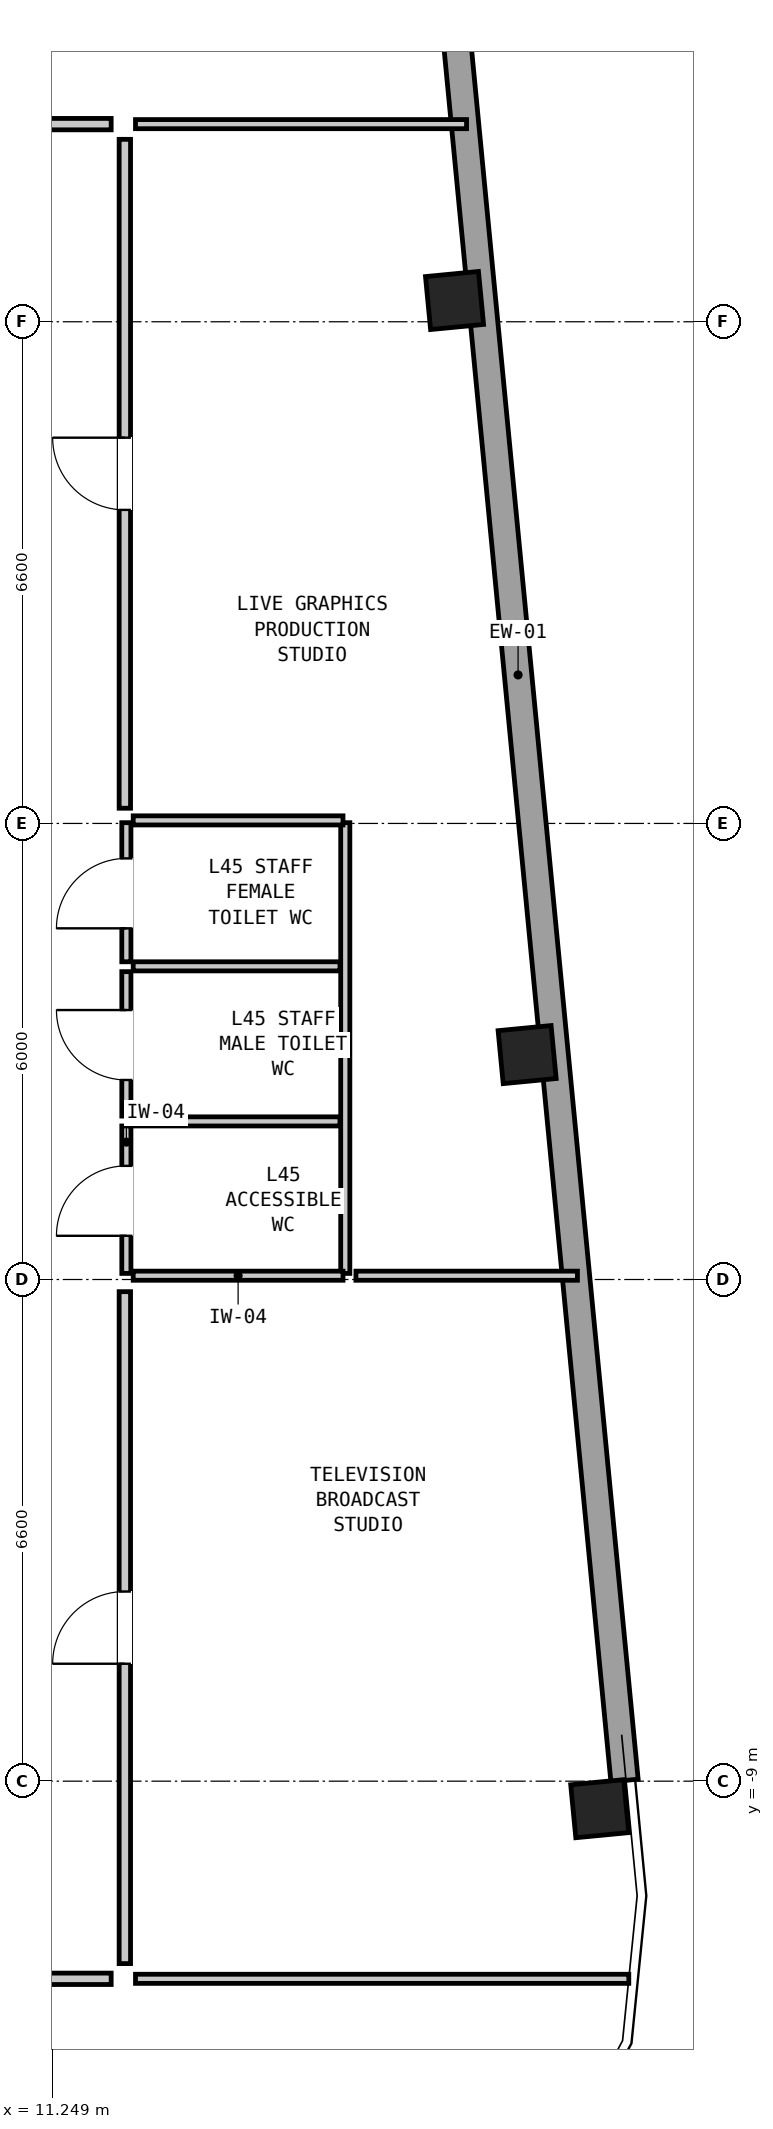
"""IFC4 building model, lengths in metres.
Left out: names, types, materials, properties, quantities, classifications, styles, units other than length and angle.
Written with IfcOpenShell. Run it as: python <this file> out.ifc"""

import sys

from ifc_helpers import new_model, si_unit, direction, frame, frame_2d, origin, origin_2d, place, context, subcontext, project, spatial, rectangle, hollow_rectangle, extrude, element, fill, save


model = new_model("IFC4")
c1 = context("Model", 3, precision=1e-05, world=origin(), true_north=direction((0.0, 1.0)))
c2 = subcontext(c1, "Body", "Model", "MODEL_VIEW")
j1 = project(units=[si_unit("LENGTHUNIT", "METRE"), si_unit("PLANEANGLEUNIT", "RADIAN")], contexts=[c1])
p1 = place(None, origin())
s1 = spatial("IfcSite", under=j1, at=p1, CompositionType="ELEMENT")
p2 = place(p1, origin())
s2 = spatial("IfcBuilding", under=s1, at=p2, CompositionType="ELEMENT")
p3 = place(p2, frame((0.0, 0.0, 156.15)))
s3 = spatial("IfcBuildingStorey", under=s2, at=p3, CompositionType="ELEMENT", Elevation=156.15)
for number, where, z_axis, x_axis in (
    (1, (18.448, -9.362, 0.0), (0.0, 0.0, 1.0), (-0.096, 0.995, 0.0)),
    (2, (17.493, 0.559, 0.0), (0.0, 0.0, 1.0), (-0.096, 0.995, 0.0)),
    (3, (16.537, 10.479, 0.0), (0.0, 0.0, 1.0), (-0.096, 0.995, 0.0)),
):
    element("IfcColumn", number, at=place(p3, frame(where, z_axis=z_axis, x_axis=x_axis)), inside=s3, PredefinedType="COLUMN", context=c2, shape_type="SweptSolid", body=[
        extrude(hollow_rectangle(XDim=0.7, YDim=0.7, WallThickness=0.045, at=origin_2d()), origin(), (0.0, 0.0, 1.0), 3.05),
    ])
p4 = place(p3, frame((15.973, 20.098, 0.0), z_axis=(0.0, 0.0, 1.0), x_axis=(0.09583879873, -0.995396867916, 0.0)))
e4 = element("IfcWall", 4, at=p4, inside=s3, PredefinedType="SOLIDWALL", context=c2, shape_type="SweptSolid", body=[
    extrude(rectangle(XDim=29.224, YDim=0.36, at=frame_2d((14.612, 0.0))), origin(), (0.0, 0.0, 1.0), 0.48),
])
p5 = place(p3, frame((12.22, -2.32, 0.0), z_axis=(0.0, 0.0, 1.0), x_axis=(0.0, 1.0, 0.0)))
e5 = element("IfcWall", 5, at=p5, inside=s3, PredefinedType="PARTITIONING", context=c2, shape_type="SweptSolid", body=[
    extrude(rectangle(XDim=1.94, YDim=0.12, at=frame_2d((0.97, 0.0))), origin(), (0.0, 0.0, 1.0), 2.83),
])
p6 = place(p5, frame((0.495, 0.0, 0.0)))
e6 = element("IfcOpeningElement", 6, at=p6, cuts=e5, PredefinedType="OPENING", context=c2, shape_type="SweptSolid", body=[
    extrude(rectangle(XDim=0.92, YDim=2.1, at=frame_2d((0.46, 1.05))), frame((0.0, 0.072, 0.0), z_axis=(0.0, -1.0, 0.0), x_axis=(1.0, 0.0, 0.0)), (0.0, 0.0, 1.0), 0.144),
])
p7 = place(p3, frame((12.22, -0.25, 0.0), z_axis=(0.0, 0.0, 1.0), x_axis=(0.0, 1.0, 0.0)))
e7 = element("IfcWall", 7, at=p7, inside=s3, PredefinedType="PARTITIONING", context=c2, shape_type="SweptSolid", body=[
    extrude(rectangle(XDim=1.9, YDim=0.12, at=frame_2d((0.95, 0.0))), origin(), (0.0, 0.0, 1.0), 2.83),
])
p8 = place(p7, frame((0.475, 0.0, 0.0)))
e8 = element("IfcOpeningElement", 8, at=p8, cuts=e7, PredefinedType="OPENING", context=c2, shape_type="SweptSolid", body=[
    extrude(rectangle(XDim=0.92, YDim=2.1, at=frame_2d((0.46, 1.05))), frame((0.0, 0.072, 0.0), z_axis=(0.0, -1.0, 0.0), x_axis=(1.0, 0.0, 0.0)), (0.0, 0.0, 1.0), 0.144),
])
p9 = place(p3, frame((12.22, 1.78, 0.0), z_axis=(0.0, 0.0, 1.0), x_axis=(0.0, 1.0, 0.0)))
e9 = element("IfcWall", 9, at=p9, inside=s3, PredefinedType="PARTITIONING", context=c2, shape_type="SweptSolid", body=[
    extrude(rectangle(XDim=1.83, YDim=0.12, at=frame_2d((0.915, 0.0))), origin(), (0.0, 0.0, 1.0), 2.83),
])
p10 = place(p9, frame((0.44, 0.0, 0.0)))
e10 = element("IfcOpeningElement", 10, at=p10, cuts=e9, PredefinedType="OPENING", context=c2, shape_type="SweptSolid", body=[
    extrude(rectangle(XDim=0.92, YDim=2.1, at=frame_2d((0.46, 1.05))), frame((0.0, 0.072, 0.0), z_axis=(0.0, -1.0, 0.0), x_axis=(1.0, 0.0, 0.0)), (0.0, 0.0, 1.0), 0.144),
])
p11 = place(p3, frame((15.1, -2.32, 0.0), z_axis=(0.0, 0.0, 1.0), x_axis=(0.0, 1.0, 0.0)))
e11 = element("IfcWall", 11, at=p11, inside=s3, PredefinedType="PARTITIONING", context=c2, shape_type="SweptSolid", body=[
    extrude(rectangle(XDim=5.93, YDim=0.12, at=frame_2d((2.965, 0.0))), origin(), (0.0, 0.0, 1.0), 2.83),
])
for number, where, z_axis, x_axis in (
    (12, (12.31, -2.35, 0.0), (0.0, 0.0, 1.0), (1.0, 0.0, 0.0)),
    (13, (12.31, 3.64, 0.0), (0.0, 0.0, 1.0), (1.0, 0.0, 0.0)),
):
    element("IfcWall", number, at=place(p3, frame(where, z_axis=z_axis, x_axis=x_axis)), inside=s3, PredefinedType="PARTITIONING", context=c2, shape_type="SweptSolid", body=[
        extrude(rectangle(XDim=2.76, YDim=0.12, at=frame_2d((1.38, 0.0))), origin(), (0.0, 0.0, 1.0), 1.692),
    ])
for number, where, z_axis, x_axis in (
    (14, (12.31, -0.32, 0.0), (0.0, 0.0, 1.0), (1.0, 0.0, 0.0)),
    (15, (12.31, 1.72, 0.0), (0.0, 0.0, 1.0), (1.0, 0.0, 0.0)),
):
    element("IfcWall", number, at=place(p3, frame(where, z_axis=z_axis, x_axis=x_axis)), inside=s3, PredefinedType="PARTITIONING", context=c2, shape_type="SweptSolid", body=[
        extrude(rectangle(XDim=2.72, YDim=0.12, at=frame_2d((1.36, 0.0))), origin(), (0.0, 0.0, 1.0), 2.83),
    ])
p12 = place(p3, frame((12.34, 12.8, 0.0), z_axis=(0.0, 0.0, 1.0), x_axis=(1.0, 0.0, 0.0)))
e16 = element("IfcWall", 16, at=p12, inside=s3, PredefinedType="PARTITIONING", context=c2, shape_type="SweptSolid", body=[
    extrude(rectangle(XDim=4.355, YDim=0.12, at=frame_2d((2.178, 0.0))), origin(), (0.0, 0.0, 1.0), 2.83),
])
p13 = place(p3, frame((12.34, -11.6, 0.0), z_axis=(0.0, 0.0, 1.0), x_axis=(1.0, 0.0, 0.0)))
e17 = element("IfcWall", 17, at=p13, inside=s3, PredefinedType="PARTITIONING", context=c2, shape_type="SweptSolid", body=[
    extrude(rectangle(XDim=6.49, YDim=0.12, at=frame_2d((3.245, 0.0))), origin(), (0.0, 0.0, 1.0), 2.347),
])
p14 = place(p3, frame((15.24, -2.35, 0.0), z_axis=(0.0, 0.0, 1.0), x_axis=(1.0, 0.0, 0.0)))
e18 = element("IfcWall", 18, at=p14, inside=s3, PredefinedType="PARTITIONING", context=c2, shape_type="SweptSolid", body=[
    extrude(rectangle(XDim=2.914, YDim=0.12, at=frame_2d((1.457, 0.0))), origin(), (0.0, 0.0, 1.0), 1.692),
])
p15 = place(p3, frame((-1.52, 12.8, 0.0), z_axis=(0.0, 0.0, 1.0), x_axis=(1.0, 0.0, 0.0)))
e19 = element("IfcWall", 19, at=p15, inside=s3, PredefinedType="PARTITIONING", context=c2, shape_type="SweptSolid", body=[
    extrude(rectangle(XDim=13.54, YDim=0.15, at=frame_2d((6.77, 0.0))), origin(), (0.0, 0.0, 1.0), 2.83),
])
p16 = place(p15, frame((6.295, 0.0, 0.0)))
e20 = element("IfcOpeningElement", 20, at=p16, cuts=e19, PredefinedType="OPENING", context=c2, shape_type="SweptSolid", body=[
    extrude(rectangle(XDim=0.95, YDim=2.1, at=frame_2d((0.475, 1.05))), frame((0.0, 0.087, 0.0), z_axis=(0.0, -1.0, 0.0), x_axis=(1.0, 0.0, 0.0)), (0.0, 0.0, 1.0), 0.174),
])
p17 = place(p3, frame((-12.02, -11.6, 0.0), z_axis=(0.0, 0.0, 1.0), x_axis=(1.0, 0.0, 0.0)))
e21 = element("IfcWall", 21, at=p17, inside=s3, PredefinedType="PARTITIONING", context=c2, shape_type="SweptSolid", body=[
    extrude(rectangle(XDim=24.04, YDim=0.15, at=frame_2d((12.02, 0.0))), origin(), (0.0, 0.0, 1.0), 2.347),
])
p18 = place(p17, frame((11.545, 0.0, 0.0)))
e22 = element("IfcOpeningElement", 22, at=p18, cuts=e21, PredefinedType="OPENING", context=c2, shape_type="SweptSolid", body=[
    extrude(rectangle(XDim=0.95, YDim=2.1, at=frame_2d((0.475, 1.05))), frame((0.0, 0.087, 0.0), z_axis=(0.0, -1.0, 0.0), x_axis=(1.0, 0.0, 0.0)), (0.0, 0.0, 1.0), 0.174),
])
p19 = place(p3, frame((12.2, -11.4, 0.0), z_axis=(0.0, 0.0, 1.0), x_axis=(0.0, 1.0, 0.0)))
e23 = element("IfcWall", 23, at=p19, inside=s3, PredefinedType="PARTITIONING", context=c2, shape_type="SweptSolid", body=[
    extrude(rectangle(XDim=8.84, YDim=0.15, at=frame_2d((4.42, 0.0))), origin(), (0.0, 0.0, 1.0), 2.83),
])
p20 = place(p19, frame((3.945, 0.0, 0.0)))
e24 = element("IfcOpeningElement", 24, at=p20, cuts=e23, PredefinedType="OPENING", context=c2, shape_type="SweptSolid", body=[
    extrude(rectangle(XDim=0.95, YDim=2.1, at=frame_2d((0.475, 1.05))), frame((0.0, 0.087, 0.0), z_axis=(0.0, -1.0, 0.0), x_axis=(1.0, 0.0, 0.0)), (0.0, 0.0, 1.0), 0.174),
])
p21 = place(p3, frame((12.2, 3.8, 0.0), z_axis=(0.0, 0.0, 1.0), x_axis=(0.0, 1.0, 0.0)))
e25 = element("IfcWall", 25, at=p21, inside=s3, PredefinedType="PARTITIONING", context=c2, shape_type="SweptSolid", body=[
    extrude(rectangle(XDim=8.8, YDim=0.15, at=frame_2d((4.4, 0.0))), origin(), (0.0, 0.0, 1.0), 2.83),
])
p22 = place(p21, frame((3.925, 0.0, 0.0)))
e26 = element("IfcOpeningElement", 26, at=p22, cuts=e25, PredefinedType="OPENING", context=c2, shape_type="SweptSolid", body=[
    extrude(rectangle(XDim=0.95, YDim=2.1, at=frame_2d((0.475, 1.05))), frame((0.0, 0.087, 0.0), z_axis=(0.0, -1.0, 0.0), x_axis=(1.0, 0.0, 0.0)), (0.0, 0.0, 1.0), 0.174),
])
p23 = place(p6, origin())
e27 = element("IfcDoor", 27, at=p23, inside=s3, OperationType="SINGLE_SWING_LEFT", PredefinedType="DOOR", context=c2, shape_type="SweptSolid", body=[
    extrude(rectangle(XDim=0.92, YDim=2.1, at=frame_2d((0.46, 1.05))), frame((0.0, 0.025, 0.0), z_axis=(0.0, -1.0, 0.0), x_axis=(1.0, 0.0, 0.0)), (0.0, 0.0, 1.0), 0.05),
])
fill(e6, e27)
p24 = place(p8, origin())
e28 = element("IfcDoor", 28, at=p24, inside=s3, OperationType="SINGLE_SWING_RIGHT", PredefinedType="DOOR", context=c2, shape_type="SweptSolid", body=[
    extrude(rectangle(XDim=0.92, YDim=2.1, at=frame_2d((0.46, 1.05))), frame((0.0, 0.025, 0.0), z_axis=(0.0, -1.0, 0.0), x_axis=(1.0, 0.0, 0.0)), (0.0, 0.0, 1.0), 0.05),
])
fill(e8, e28)
p25 = place(p10, origin())
e29 = element("IfcDoor", 29, at=p25, inside=s3, OperationType="SINGLE_SWING_LEFT", PredefinedType="DOOR", context=c2, shape_type="SweptSolid", body=[
    extrude(rectangle(XDim=0.92, YDim=2.1, at=frame_2d((0.46, 1.05))), frame((0.0, 0.025, 0.0), z_axis=(0.0, -1.0, 0.0), x_axis=(1.0, 0.0, 0.0)), (0.0, 0.0, 1.0), 0.05),
])
fill(e10, e29)
p26 = place(p20, origin())
e30 = element("IfcDoor", 30, at=p26, inside=s3, OperationType="SINGLE_SWING_LEFT", PredefinedType="DOOR", context=c2, shape_type="SweptSolid", body=[
    extrude(rectangle(XDim=0.95, YDim=2.1, at=frame_2d((0.475, 1.05))), frame((0.0, 0.025, 0.0), z_axis=(0.0, -1.0, 0.0), x_axis=(1.0, 0.0, 0.0)), (0.0, 0.0, 1.0), 0.05),
])
fill(e24, e30)
p27 = place(p22, origin())
e31 = element("IfcDoor", 31, at=p27, inside=s3, OperationType="SINGLE_SWING_RIGHT", PredefinedType="DOOR", context=c2, shape_type="SweptSolid", body=[
    extrude(rectangle(XDim=0.95, YDim=2.1, at=frame_2d((0.475, 1.05))), frame((0.0, 0.025, 0.0), z_axis=(0.0, -1.0, 0.0), x_axis=(1.0, 0.0, 0.0)), (0.0, 0.0, 1.0), 0.05),
])
fill(e26, e31)
save(model, sys.argv[1])
